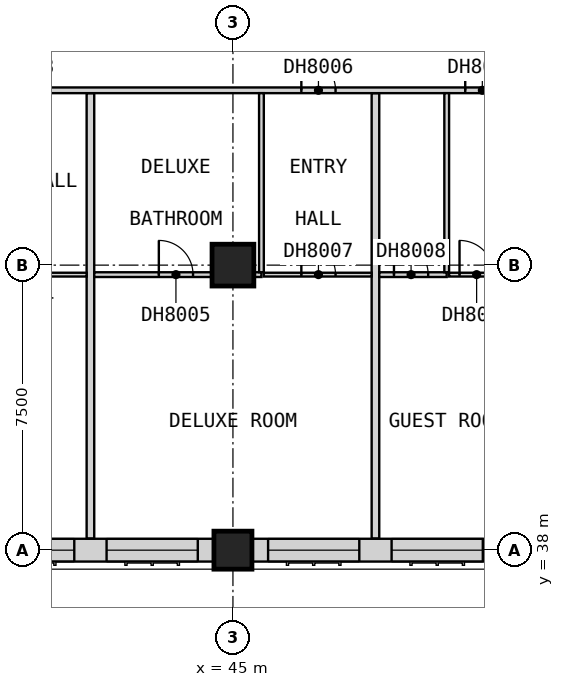
"""IFC4 building model, lengths in metres.
Left out: names, types, materials, properties, quantities, classifications, styles, units other than length and angle.
Written with IfcOpenShell. Run it as: python <this file> out.ifc"""

import sys

from ifc_helpers import new_model, si_unit, direction, frame, frame_2d, origin, origin_2d, place, context, subcontext, project, spatial, rectangle, extrude, element, fill, save


model = new_model("IFC4")
c1 = context("Model", 3, precision=1e-05, world=origin(), true_north=direction((0.0, 1.0)))
c2 = subcontext(c1, "Body", "Model", "MODEL_VIEW")
j1 = project(units=[si_unit("LENGTHUNIT", "METRE"), si_unit("PLANEANGLEUNIT", "RADIAN")], contexts=[c1])
p1 = place(None, origin())
s1 = spatial("IfcSite", under=j1, at=p1, CompositionType="ELEMENT")
p2 = place(p1, origin())
s2 = spatial("IfcBuilding", under=s1, at=p2, CompositionType="ELEMENT")
p3 = place(p2, frame((0.0, 0.0, 89.9)))
s3 = spatial("IfcBuildingStorey", under=s2, at=p3, CompositionType="ELEMENT", Elevation=89.9)
p4 = place(p3, frame((45.0, 38.0, 0.0), z_axis=(0.0, 0.0, 1.0), x_axis=(1.0, 0.0, 0.0)))
e1 = element("IfcColumn", 1, at=p4, inside=s3, PredefinedType="COLUMN", context=c2, shape_type="SweptSolid", body=[
    extrude(rectangle(XDim=1.0, YDim=1.0, at=origin_2d()), origin(), (0.0, 0.0, 1.0), 3.6),
])
p5 = place(p3, frame((45.0, 45.5, 0.0), z_axis=(0.0, 0.0, 1.0), x_axis=(1.0, 0.0, 0.0)))
e2 = element("IfcColumn", 2, at=p5, inside=s3, PredefinedType="COLUMN", context=c2, shape_type="SweptSolid", body=[
    extrude(rectangle(XDim=1.1, YDim=1.1, at=origin_2d()), origin(), (0.0, 0.0, 1.0), 3.6),
])
p6 = place(p3, frame((38.0, 38.0, 0.0), z_axis=(0.0, 0.0, 1.0), x_axis=(1.0, 0.0, 0.0)))
e3 = element("IfcWall", 3, at=p6, inside=s3, PredefinedType="SOLIDWALL", context=c2, shape_type="SweptSolid", body=[
    extrude(rectangle(XDim=6.5, YDim=0.6, at=frame_2d((3.25, 0.0))), origin(), (0.0, 0.0, 1.0), 2.85),
])
p7 = place(p6, frame((0.425, 0.0, 0.8)))
e4 = element("IfcOpeningElement", 4, at=p7, cuts=e3, PredefinedType="OPENING", context=c2, shape_type="SweptSolid", body=[
    extrude(rectangle(XDim=2.4, YDim=1.8, at=frame_2d((1.2, 0.9))), frame((0.0, 0.31, 0.0), z_axis=(0.0, -1.0, 0.0), x_axis=(1.0, 0.0, 0.0)), (0.0, 0.0, 1.0), 0.62),
])
p8 = place(p6, frame((3.675, 0.0, 0.8)))
e5 = element("IfcOpeningElement", 5, at=p8, cuts=e3, PredefinedType="OPENING", context=c2, shape_type="SweptSolid", body=[
    extrude(rectangle(XDim=2.4, YDim=1.8, at=frame_2d((1.2, 0.9))), frame((0.0, 0.31, 0.0), z_axis=(0.0, -1.0, 0.0), x_axis=(1.0, 0.0, 0.0)), (0.0, 0.0, 1.0), 0.62),
])
p9 = place(p3, frame((45.5, 38.0, 0.0), z_axis=(0.0, 0.0, 1.0), x_axis=(1.0, 0.0, 0.0)))
e6 = element("IfcWall", 6, at=p9, inside=s3, PredefinedType="SOLIDWALL", context=c2, shape_type="SweptSolid", body=[
    extrude(rectangle(XDim=6.5, YDim=0.6, at=frame_2d((3.25, 0.0))), origin(), (0.0, 0.0, 1.0), 2.85),
])
p10 = place(p9, frame((0.425, 0.0, 0.8)))
e7 = element("IfcOpeningElement", 7, at=p10, cuts=e6, PredefinedType="OPENING", context=c2, shape_type="SweptSolid", body=[
    extrude(rectangle(XDim=2.4, YDim=1.8, at=frame_2d((1.2, 0.9))), frame((0.0, 0.31, 0.0), z_axis=(0.0, -1.0, 0.0), x_axis=(1.0, 0.0, 0.0)), (0.0, 0.0, 1.0), 0.62),
])
p11 = place(p9, frame((3.675, 0.0, 0.8)))
e8 = element("IfcOpeningElement", 8, at=p11, cuts=e6, PredefinedType="OPENING", context=c2, shape_type="SweptSolid", body=[
    extrude(rectangle(XDim=2.4, YDim=1.8, at=frame_2d((1.2, 0.9))), frame((0.0, 0.31, 0.0), z_axis=(0.0, -1.0, 0.0), x_axis=(1.0, 0.0, 0.0)), (0.0, 0.0, 1.0), 0.62),
])
for number, where, z_axis, x_axis in (
    (9, (41.25, 38.31, 0.0), (0.0, 0.0, 1.0), (0.0, 1.0, 0.0)),
    (10, (48.75, 38.31, 0.0), (0.0, 0.0, 1.0), (0.0, 1.0, 0.0)),
):
    element("IfcWall", number, at=place(p3, frame(where, z_axis=z_axis, x_axis=x_axis)), inside=s3, PredefinedType="PARTITIONING", context=c2, shape_type="SweptSolid", body=[
        extrude(rectangle(XDim=11.715, YDim=0.2, at=frame_2d((5.857, 0.0))), origin(), (0.0, 0.0, 1.0), 3.35),
    ])
p12 = place(p3, frame((33.75, 50.1, 0.0), z_axis=(0.0, 0.0, 1.0), x_axis=(1.0, 0.0, 0.0)))
e11 = element("IfcWall", 11, at=p12, inside=s3, PredefinedType="PARTITIONING", context=c2, shape_type="SweptSolid", body=[
    extrude(rectangle(XDim=43.65, YDim=0.15, at=frame_2d((21.825, 0.0))), origin(), (0.0, 0.0, 1.0), 3.35),
])
p13 = place(p12, frame((5.175, 0.0, 0.0)))
e12 = element("IfcOpeningElement", 12, at=p13, cuts=e11, PredefinedType="OPENING", context=c2, shape_type="SweptSolid", body=[
    extrude(rectangle(XDim=0.9, YDim=2.1, at=frame_2d((0.45, 1.05))), frame((0.0, 0.085, 0.0), z_axis=(0.0, -1.0, 0.0), x_axis=(1.0, 0.0, 0.0)), (0.0, 0.0, 1.0), 0.17),
])
p14 = place(p12, frame((13.05, 0.0, 0.0)))
e13 = element("IfcOpeningElement", 13, at=p14, cuts=e11, PredefinedType="OPENING", context=c2, shape_type="SweptSolid", body=[
    extrude(rectangle(XDim=0.9, YDim=2.1, at=frame_2d((0.45, 1.05))), frame((0.0, 0.085, 0.0), z_axis=(0.0, -1.0, 0.0), x_axis=(1.0, 0.0, 0.0)), (0.0, 0.0, 1.0), 0.17),
])
p15 = place(p12, frame((17.363, 0.0, 0.0)))
e14 = element("IfcOpeningElement", 14, at=p15, cuts=e11, PredefinedType="OPENING", context=c2, shape_type="SweptSolid", body=[
    extrude(rectangle(XDim=0.9, YDim=2.1, at=frame_2d((0.45, 1.05))), frame((0.0, 0.085, 0.0), z_axis=(0.0, -1.0, 0.0), x_axis=(1.0, 0.0, 0.0)), (0.0, 0.0, 1.0), 0.17),
])
p16 = place(p12, frame((21.113, 0.0, 0.0)))
e15 = element("IfcOpeningElement", 15, at=p16, cuts=e11, PredefinedType="OPENING", context=c2, shape_type="SweptSolid", body=[
    extrude(rectangle(XDim=0.9, YDim=2.1, at=frame_2d((0.45, 1.05))), frame((0.0, 0.085, 0.0), z_axis=(0.0, -1.0, 0.0), x_axis=(1.0, 0.0, 0.0)), (0.0, 0.0, 1.0), 0.17),
])
p17 = place(p12, frame((28.05, 0.0, 0.0)))
e16 = element("IfcOpeningElement", 16, at=p17, cuts=e11, PredefinedType="OPENING", context=c2, shape_type="SweptSolid", body=[
    extrude(rectangle(XDim=0.9, YDim=2.1, at=frame_2d((0.45, 1.05))), frame((0.0, 0.085, 0.0), z_axis=(0.0, -1.0, 0.0), x_axis=(1.0, 0.0, 0.0)), (0.0, 0.0, 1.0), 0.17),
])
p18 = place(p12, frame((32.363, 0.0, 0.0)))
e17 = element("IfcOpeningElement", 17, at=p18, cuts=e11, PredefinedType="OPENING", context=c2, shape_type="SweptSolid", body=[
    extrude(rectangle(XDim=0.9, YDim=2.1, at=frame_2d((0.45, 1.05))), frame((0.0, 0.085, 0.0), z_axis=(0.0, -1.0, 0.0), x_axis=(1.0, 0.0, 0.0)), (0.0, 0.0, 1.0), 0.17),
])
p19 = place(p12, frame((39.3, 0.0, 0.0)))
e18 = element("IfcOpeningElement", 18, at=p19, cuts=e11, PredefinedType="OPENING", context=c2, shape_type="SweptSolid", body=[
    extrude(rectangle(XDim=0.9, YDim=2.1, at=frame_2d((0.45, 1.05))), frame((0.0, 0.085, 0.0), z_axis=(0.0, -1.0, 0.0), x_axis=(1.0, 0.0, 0.0)), (0.0, 0.0, 1.0), 0.17),
])
p20 = place(p12, frame((42.0, 0.0, 0.0)))
e19 = element("IfcOpeningElement", 19, at=p20, cuts=e11, PredefinedType="OPENING", context=c2, shape_type="SweptSolid", body=[
    extrude(rectangle(XDim=0.9, YDim=2.1, at=frame_2d((0.45, 1.05))), frame((0.0, 0.085, 0.0), z_axis=(0.0, -1.0, 0.0), x_axis=(1.0, 0.0, 0.0)), (0.0, 0.0, 1.0), 0.17),
])
p21 = place(p3, frame((33.812, 45.25, 0.0), z_axis=(0.0, 0.0, 1.0), x_axis=(1.0, 0.0, 0.0)))
e20 = element("IfcWall", 20, at=p21, inside=s3, PredefinedType="PARTITIONING", context=c2, shape_type="SweptSolid", body=[
    extrude(rectangle(XDim=7.337, YDim=0.1, at=frame_2d((3.669, 0.0))), origin(), (0.0, 0.0, 1.0), 3.35),
])
p22 = place(p21, frame((5.113, 0.0, 0.0)))
e21 = element("IfcOpeningElement", 21, at=p22, cuts=e20, PredefinedType="OPENING", context=c2, shape_type="SweptSolid", body=[
    extrude(rectangle(XDim=0.9, YDim=2.1, at=frame_2d((0.45, 1.05))), frame((0.0, 0.06, 0.0), z_axis=(0.0, -1.0, 0.0), x_axis=(1.0, 0.0, 0.0)), (0.0, 0.0, 1.0), 0.12),
])
p23 = place(p3, frame((45.812, 45.25, 0.0), z_axis=(0.0, 0.0, 1.0), x_axis=(1.0, 0.0, 0.0)))
e22 = element("IfcWall", 22, at=p23, inside=s3, PredefinedType="PARTITIONING", context=c2, shape_type="SweptSolid", body=[
    extrude(rectangle(XDim=2.837, YDim=0.1, at=frame_2d((1.419, 0.0))), origin(), (0.0, 0.0, 1.0), 3.35),
])
p24 = place(p23, frame((0.988, 0.0, 0.0)))
e23 = element("IfcOpeningElement", 23, at=p24, cuts=e22, PredefinedType="OPENING", context=c2, shape_type="SweptSolid", body=[
    extrude(rectangle(XDim=0.9, YDim=2.1, at=frame_2d((0.45, 1.05))), frame((0.0, 0.06, 0.0), z_axis=(0.0, -1.0, 0.0), x_axis=(1.0, 0.0, 0.0)), (0.0, 0.0, 1.0), 0.12),
])
p25 = place(p3, frame((50.688, 45.25, 0.0), z_axis=(0.0, 0.0, 1.0), x_axis=(1.0, 0.0, 0.0)))
e24 = element("IfcWall", 24, at=p25, inside=s3, PredefinedType="PARTITIONING", context=c2, shape_type="SweptSolid", body=[
    extrude(rectangle(XDim=1.712, YDim=0.1, at=frame_2d((0.856, 0.0))), origin(), (0.0, 0.0, 1.0), 3.35),
])
p26 = place(p25, frame((0.275, 0.0, 0.0)))
e25 = element("IfcOpeningElement", 25, at=p26, cuts=e24, PredefinedType="OPENING", context=c2, shape_type="SweptSolid", body=[
    extrude(rectangle(XDim=0.9, YDim=2.1, at=frame_2d((0.45, 1.05))), frame((0.0, 0.06, 0.0), z_axis=(0.0, -1.0, 0.0), x_axis=(1.0, 0.0, 0.0)), (0.0, 0.0, 1.0), 0.12),
])
p27 = place(p3, frame((41.35, 45.25, 0.0), z_axis=(0.0, 0.0, 1.0), x_axis=(1.0, 0.0, 0.0)))
e26 = element("IfcWall", 26, at=p27, inside=s3, PredefinedType="PARTITIONING", context=c2, shape_type="SweptSolid", body=[
    extrude(rectangle(XDim=4.4, YDim=0.125, at=frame_2d((2.2, 0.0))), origin(), (0.0, 0.0, 1.0), 3.35),
])
p28 = place(p27, frame((1.7, 0.0, 0.0)))
e27 = element("IfcOpeningElement", 27, at=p28, cuts=e26, PredefinedType="OPENING", context=c2, shape_type="SweptSolid", body=[
    extrude(rectangle(XDim=0.9, YDim=2.1, at=frame_2d((0.45, 1.05))), frame((0.0, 0.073, 0.0), z_axis=(0.0, -1.0, 0.0), x_axis=(1.0, 0.0, 0.0)), (0.0, 0.0, 1.0), 0.145),
])
p29 = place(p3, frame((48.85, 45.25, 0.0), z_axis=(0.0, 0.0, 1.0), x_axis=(1.0, 0.0, 0.0)))
e28 = element("IfcWall", 28, at=p29, inside=s3, PredefinedType="PARTITIONING", context=c2, shape_type="SweptSolid", body=[
    extrude(rectangle(XDim=1.775, YDim=0.125, at=frame_2d((0.887, 0.0))), origin(), (0.0, 0.0, 1.0), 3.35),
])
p30 = place(p29, frame((0.387, 0.0, 0.0)))
e29 = element("IfcOpeningElement", 29, at=p30, cuts=e28, PredefinedType="OPENING", context=c2, shape_type="SweptSolid", body=[
    extrude(rectangle(XDim=0.9, YDim=2.1, at=frame_2d((0.45, 1.05))), frame((0.0, 0.073, 0.0), z_axis=(0.0, -1.0, 0.0), x_axis=(1.0, 0.0, 0.0)), (0.0, 0.0, 1.0), 0.145),
])
for number, where, z_axis, x_axis in (
    (30, (45.75, 45.312, 0.0), (0.0, 0.0, 1.0), (0.0, 1.0, 0.0)),
    (31, (50.625, 45.312, 0.0), (0.0, 0.0, 1.0), (0.0, 1.0, 0.0)),
):
    element("IfcWall", number, at=place(p3, frame(where, z_axis=z_axis, x_axis=x_axis)), inside=s3, PredefinedType="PARTITIONING", context=c2, shape_type="SweptSolid", body=[
        extrude(rectangle(XDim=4.712, YDim=0.125, at=frame_2d((2.356, 0.0))), origin(), (0.0, 0.0, 1.0), 3.35),
    ])
p31 = place(p7, origin())
e32 = element("IfcWindow", 32, at=p31, inside=s3, PartitioningType="SINGLE_PANEL", PredefinedType="WINDOW", context=c2, shape_type="SweptSolid", body=[
    extrude(rectangle(XDim=2.4, YDim=1.8, at=frame_2d((1.2, 0.9))), frame((0.0, -0.07, 0.0), z_axis=(0.0, -1.0, 0.0), x_axis=(1.0, 0.0, 0.0)), (0.0, 0.0, 1.0), 0.06),
])
fill(e4, e32)
p32 = place(p8, origin())
e33 = element("IfcWindow", 33, at=p32, inside=s3, PartitioningType="SINGLE_PANEL", PredefinedType="WINDOW", context=c2, shape_type="SweptSolid", body=[
    extrude(rectangle(XDim=2.4, YDim=1.8, at=frame_2d((1.2, 0.9))), frame((0.0, -0.07, 0.0), z_axis=(0.0, -1.0, 0.0), x_axis=(1.0, 0.0, 0.0)), (0.0, 0.0, 1.0), 0.06),
])
fill(e5, e33)
p33 = place(p10, origin())
e34 = element("IfcWindow", 34, at=p33, inside=s3, PartitioningType="SINGLE_PANEL", PredefinedType="WINDOW", context=c2, shape_type="SweptSolid", body=[
    extrude(rectangle(XDim=2.4, YDim=1.8, at=frame_2d((1.2, 0.9))), frame((0.0, -0.07, 0.0), z_axis=(0.0, -1.0, 0.0), x_axis=(1.0, 0.0, 0.0)), (0.0, 0.0, 1.0), 0.06),
])
fill(e7, e34)
p34 = place(p11, origin())
e35 = element("IfcWindow", 35, at=p34, inside=s3, PartitioningType="SINGLE_PANEL", PredefinedType="WINDOW", context=c2, shape_type="SweptSolid", body=[
    extrude(rectangle(XDim=2.4, YDim=1.8, at=frame_2d((1.2, 0.9))), frame((0.0, -0.07, 0.0), z_axis=(0.0, -1.0, 0.0), x_axis=(1.0, 0.0, 0.0)), (0.0, 0.0, 1.0), 0.06),
])
fill(e8, e35)
p35 = place(p28, origin())
e36 = element("IfcDoor", 36, at=p35, inside=s3, OperationType="SINGLE_SWING_LEFT", PredefinedType="DOOR", context=c2, shape_type="SweptSolid", body=[
    extrude(rectangle(XDim=0.9, YDim=2.1, at=frame_2d((0.45, 1.05))), frame((0.0, 0.025, 0.0), z_axis=(0.0, -1.0, 0.0), x_axis=(1.0, 0.0, 0.0)), (0.0, 0.0, 1.0), 0.05),
])
fill(e27, e36)
p36 = place(p14, origin())
e37 = element("IfcDoor", 37, at=p36, inside=s3, OperationType="SINGLE_SWING_RIGHT", PredefinedType="DOOR", context=c2, shape_type="SweptSolid", body=[
    extrude(rectangle(XDim=0.9, YDim=2.1, at=frame_2d((0.45, 1.05))), frame((0.0, 0.025, 0.0), z_axis=(0.0, -1.0, 0.0), x_axis=(1.0, 0.0, 0.0)), (0.0, 0.0, 1.0), 0.05),
])
fill(e13, e37)
p37 = place(p24, origin())
e38 = element("IfcDoor", 38, at=p37, inside=s3, OperationType="SINGLE_SWING_LEFT", PredefinedType="DOOR", context=c2, shape_type="SweptSolid", body=[
    extrude(rectangle(XDim=0.9, YDim=2.1, at=frame_2d((0.45, 1.05))), frame((0.0, 0.025, 0.0), z_axis=(0.0, -1.0, 0.0), x_axis=(1.0, 0.0, 0.0)), (0.0, 0.0, 1.0), 0.05),
])
fill(e23, e38)
p38 = place(p30, origin())
e39 = element("IfcDoor", 39, at=p38, inside=s3, OperationType="SINGLE_SWING_LEFT", PredefinedType="DOOR", context=c2, shape_type="SweptSolid", body=[
    extrude(rectangle(XDim=0.9, YDim=2.1, at=frame_2d((0.45, 1.05))), frame((0.0, 0.025, 0.0), z_axis=(0.0, -1.0, 0.0), x_axis=(1.0, 0.0, 0.0)), (0.0, 0.0, 1.0), 0.05),
])
fill(e29, e39)
p39 = place(p15, origin())
e40 = element("IfcDoor", 40, at=p39, inside=s3, OperationType="SINGLE_SWING_RIGHT", PredefinedType="DOOR", context=c2, shape_type="SweptSolid", body=[
    extrude(rectangle(XDim=0.9, YDim=2.1, at=frame_2d((0.45, 1.05))), frame((0.0, 0.025, 0.0), z_axis=(0.0, -1.0, 0.0), x_axis=(1.0, 0.0, 0.0)), (0.0, 0.0, 1.0), 0.05),
])
fill(e14, e40)
p40 = place(p26, origin())
e41 = element("IfcDoor", 41, at=p40, inside=s3, OperationType="SINGLE_SWING_LEFT", PredefinedType="DOOR", context=c2, shape_type="SweptSolid", body=[
    extrude(rectangle(XDim=0.9, YDim=2.1, at=frame_2d((0.45, 1.05))), frame((0.0, 0.025, 0.0), z_axis=(0.0, -1.0, 0.0), x_axis=(1.0, 0.0, 0.0)), (0.0, 0.0, 1.0), 0.05),
])
fill(e25, e41)
save(model, sys.argv[1])
